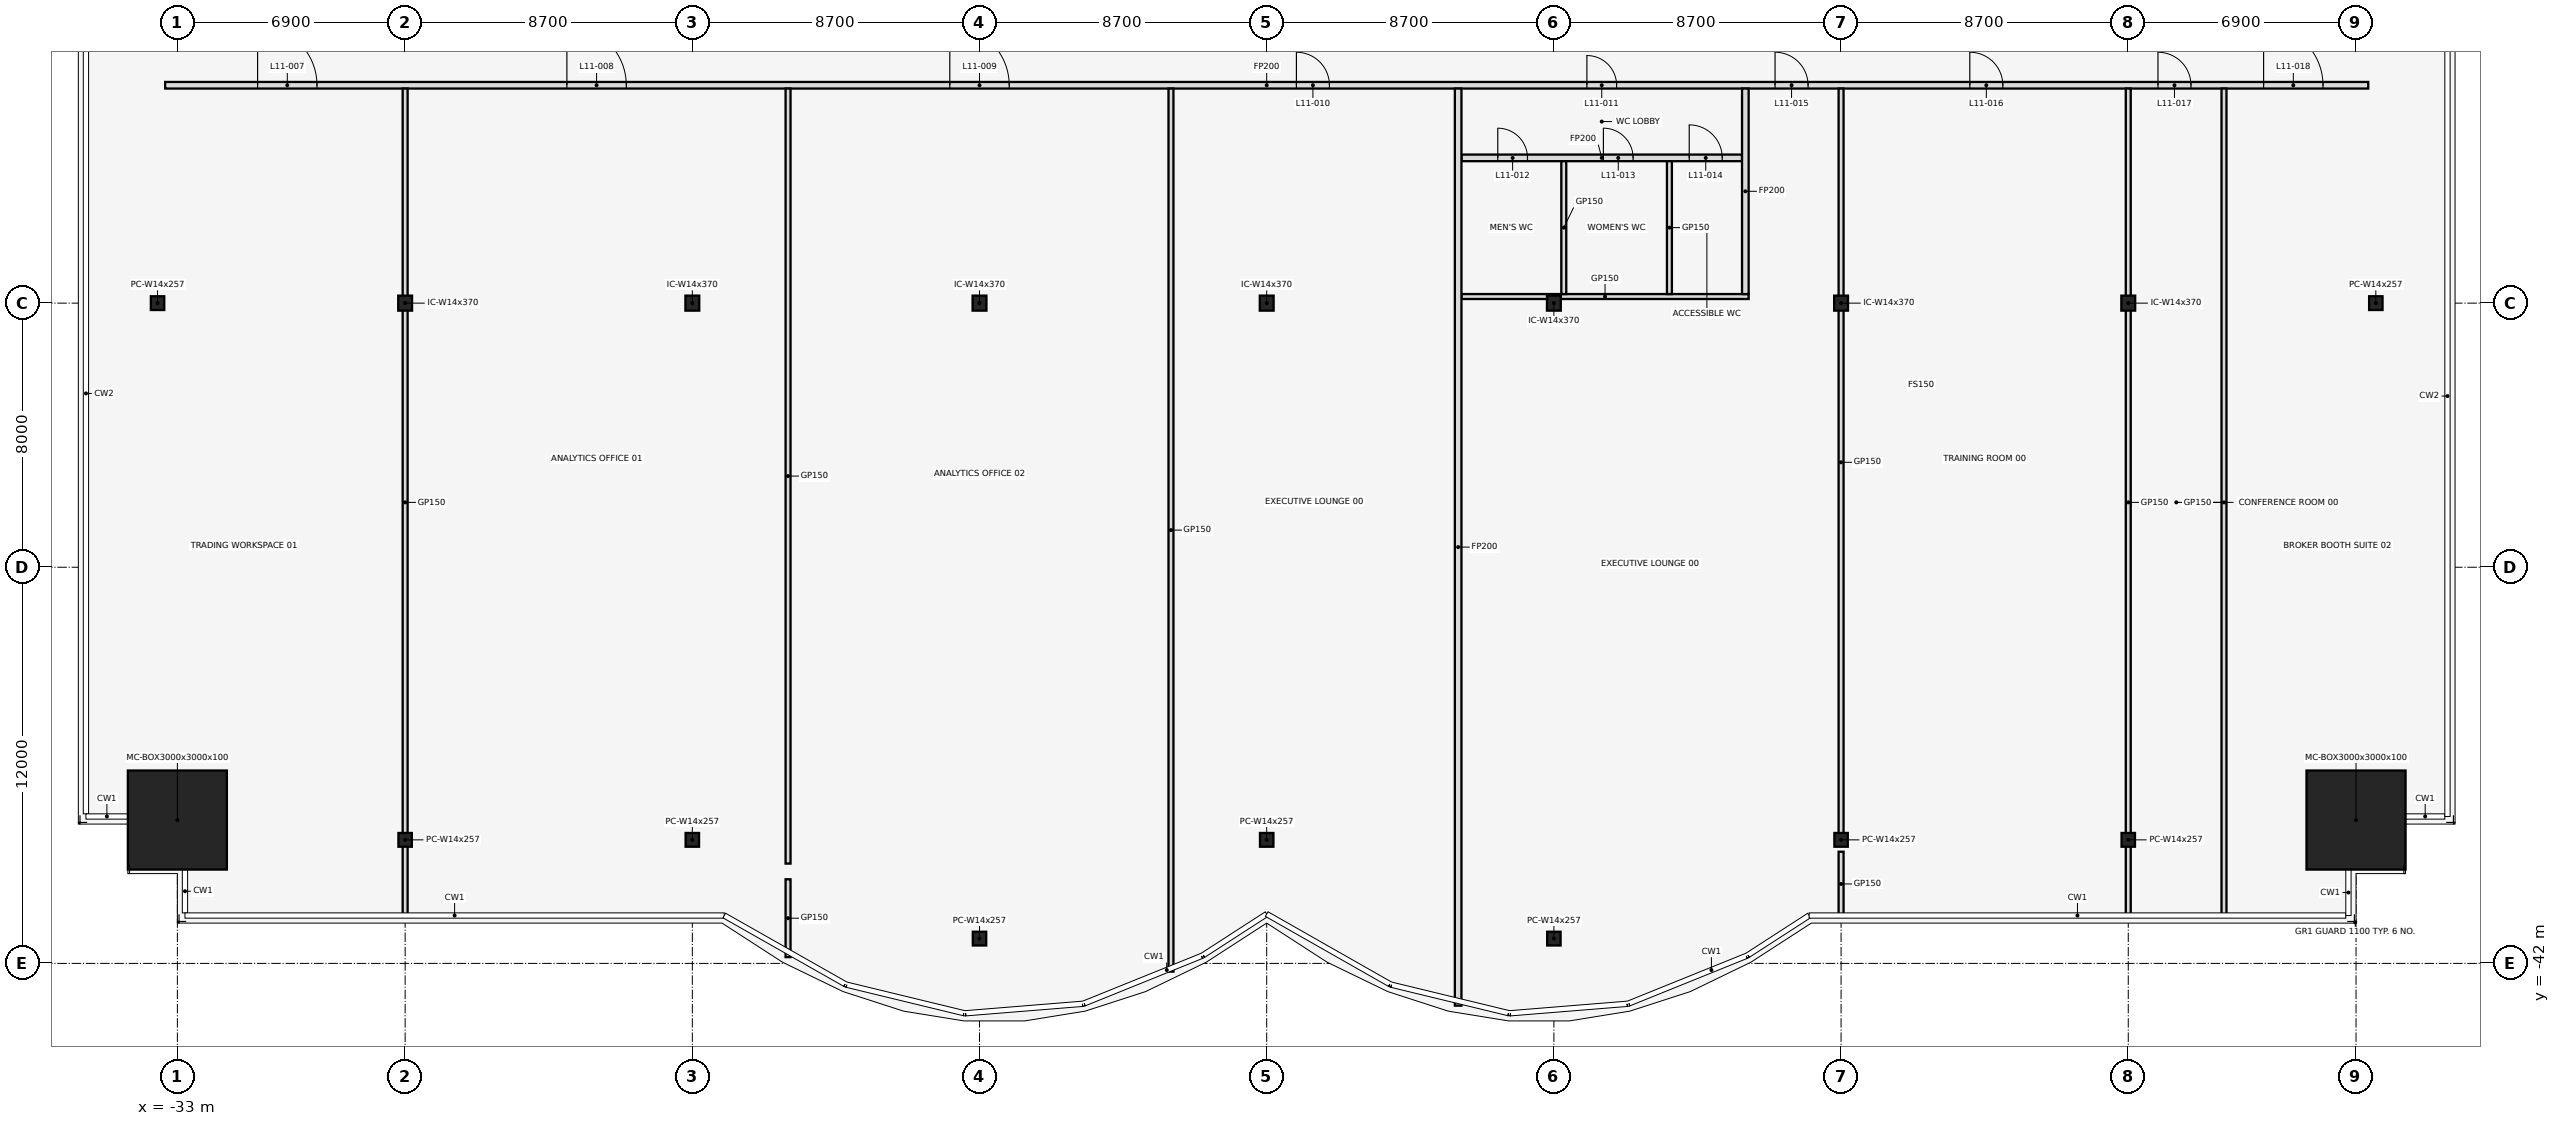
"""IFC4 building model, lengths in metres.
Left out: names, types, materials, properties, quantities, classifications, styles, units other than length and angle.
Written with IfcOpenShell. Run it as: python <this file> out.ifc"""

import sys

from ifc_helpers import new_model, si_unit, direction, frame, frame_2d, origin, origin_2d, place, context, subcontext, project, spatial, rectangle, hollow_rectangle, i_section, extrude, element, fill, save


model = new_model("IFC4")
c1 = context("Model", 3, precision=1e-05, world=origin(), true_north=direction((0.0, 1.0)))
c2 = subcontext(c1, "Body", "Model", "MODEL_VIEW")
j1 = project(units=[si_unit("LENGTHUNIT", "METRE"), si_unit("PLANEANGLEUNIT", "RADIAN")], contexts=[c1])
p1 = place(None, origin())
s1 = spatial("IfcSite", under=j1, at=p1, CompositionType="ELEMENT")
p2 = place(p1, origin())
s2 = spatial("IfcBuilding", under=s1, at=p2, CompositionType="ELEMENT")
p3 = place(p2, frame((0.0, 0.0, 57.5)))
s3 = spatial("IfcBuildingStorey", under=s2, at=p3, CompositionType="ELEMENT", Elevation=57.5)
p4 = place(p3, frame((-33.0, -37.658, 0.0), z_axis=(0.0, 0.0, 1.0), x_axis=(1.0, 0.0, 0.0)))
e1 = element("IfcColumn", 1, at=p4, inside=s3, PredefinedType="COLUMN", context=c2, shape_type="SweptSolid", body=[
    extrude(hollow_rectangle(XDim=3.0, YDim=3.0, WallThickness=0.1, at=origin_2d()), origin(), (0.0, 0.0, 1.0), 4.5),
])
for number, where, z_axis, x_axis in (
    (2, (-26.1, -38.258, 0.0), (0.0, 0.0, 1.0), (1.0, 0.0, 0.0)),
    (3, (-17.4, -38.258, 0.0), (0.0, 0.0, 1.0), (1.0, 0.0, 0.0)),
    (4, (-8.7, -41.249, 0.0), (0.0, 0.0, 1.0), (1.0, 0.0, 0.0)),
    (5, (0.0, -38.258, 0.0), (0.0, 0.0, 1.0), (1.0, 0.0, 0.0)),
    (6, (8.7, -41.249, 0.0), (0.0, 0.0, 1.0), (1.0, 0.0, 0.0)),
    (7, (17.4, -38.258, 0.0), (0.0, 0.0, 1.0), (1.0, 0.0, 0.0)),
    (8, (26.1, -38.258, 0.0), (0.0, 0.0, 1.0), (1.0, 0.0, 0.0)),
):
    element("IfcColumn", number, at=place(p3, frame(where, z_axis=z_axis, x_axis=x_axis)), inside=s3, PredefinedType="COLUMN", context=c2, shape_type="SweptSolid", body=[
        extrude(i_section(OverallWidth=0.406, OverallDepth=0.417, WebThickness=0.03, FlangeThickness=0.048, at=origin_2d()), origin(), (0.0, 0.0, 1.0), 4.5),
    ])
p5 = place(p3, frame((33.0, -37.658, 0.0), z_axis=(0.0, 0.0, 1.0), x_axis=(1.0, 0.0, 0.0)))
e9 = element("IfcColumn", 9, at=p5, inside=s3, PredefinedType="COLUMN", context=c2, shape_type="SweptSolid", body=[
    extrude(hollow_rectangle(XDim=3.0, YDim=3.0, WallThickness=0.1, at=origin_2d()), origin(), (0.0, 0.0, 1.0), 4.5),
])
for number, where, z_axis, x_axis in (
    (10, (-33.6, -22.0, 0.0), (0.0, 0.0, 1.0), (1.0, 0.0, 0.0)),
    (11, (33.6, -22.0, 0.0), (0.0, 0.0, 1.0), (1.0, 0.0, 0.0)),
):
    element("IfcColumn", number, at=place(p3, frame(where, z_axis=z_axis, x_axis=x_axis)), inside=s3, PredefinedType="COLUMN", context=c2, shape_type="SweptSolid", body=[
        extrude(i_section(OverallWidth=0.406, OverallDepth=0.417, WebThickness=0.03, FlangeThickness=0.048, at=origin_2d()), origin(), (0.0, 0.0, 1.0), 4.5),
    ])
for number, where, z_axis, x_axis in (
    (12, (-26.1, -22.0, 0.0), (0.0, 0.0, 1.0), (1.0, 0.0, 0.0)),
    (13, (-17.4, -22.0, 0.0), (0.0, 0.0, 1.0), (1.0, 0.0, 0.0)),
    (14, (-8.7, -22.0, 0.0), (0.0, 0.0, 1.0), (1.0, 0.0, 0.0)),
    (15, (0.0, -22.0, 0.0), (0.0, 0.0, 1.0), (1.0, 0.0, 0.0)),
    (16, (8.7, -22.0, 0.0), (0.0, 0.0, 1.0), (1.0, 0.0, 0.0)),
    (17, (17.4, -22.0, 0.0), (0.0, 0.0, 1.0), (1.0, 0.0, 0.0)),
    (18, (26.1, -22.0, 0.0), (0.0, 0.0, 1.0), (1.0, 0.0, 0.0)),
):
    element("IfcColumn", number, at=place(p3, frame(where, z_axis=z_axis, x_axis=x_axis)), inside=s3, PredefinedType="COLUMN", context=c2, shape_type="SweptSolid", body=[
        extrude(i_section(OverallWidth=0.419, OverallDepth=0.455, WebThickness=0.042, FlangeThickness=0.068, at=origin_2d()), origin(), (0.0, 0.0, 1.0), 4.5),
    ])
p6 = place(p3, frame((5.9, -21.8, 0.0), z_axis=(0.0, 0.0, 1.0), x_axis=(1.0, 0.0, 0.0)))
e19 = element("IfcWall", 19, at=p6, inside=s3, PredefinedType="PARTITIONING", context=c2, shape_type="SweptSolid", body=[
    extrude(rectangle(XDim=8.7, YDim=0.15, at=frame_2d((4.35, 0.0))), origin(), (0.0, 0.0, 1.0), 3.418),
])
p7 = place(p3, frame((5.9, -17.6, 0.0), z_axis=(0.0, 0.0, 1.0), x_axis=(1.0, 0.0, 0.0)))
e20 = element("IfcWall", 20, at=p7, inside=s3, PredefinedType="PARTITIONING", context=c2, shape_type="SweptSolid", body=[
    extrude(rectangle(XDim=8.5, YDim=0.2, at=frame_2d((4.25, 0.0))), origin(), (0.0, 0.0, 1.0), 3.418),
])
p8 = place(p7, frame((1.1, 0.0, 0.0)))
e21 = element("IfcOpeningElement", 21, at=p8, cuts=e20, PredefinedType="OPENING", context=c2, shape_type="SweptSolid", body=[
    extrude(rectangle(XDim=0.9, YDim=2.1, at=frame_2d((0.45, 1.05))), frame((0.0, 0.112, 0.0), z_axis=(0.0, -1.0, 0.0), x_axis=(1.0, 0.0, 0.0)), (0.0, 0.0, 1.0), 0.224),
])
p9 = place(p7, frame((4.3, 0.0, 0.0)))
e22 = element("IfcOpeningElement", 22, at=p9, cuts=e20, PredefinedType="OPENING", context=c2, shape_type="SweptSolid", body=[
    extrude(rectangle(XDim=0.9, YDim=2.1, at=frame_2d((0.45, 1.05))), frame((0.0, 0.112, 0.0), z_axis=(0.0, -1.0, 0.0), x_axis=(1.0, 0.0, 0.0)), (0.0, 0.0, 1.0), 0.224),
])
p10 = place(p7, frame((6.9, 0.0, 0.0)))
e23 = element("IfcOpeningElement", 23, at=p10, cuts=e20, PredefinedType="OPENING", context=c2, shape_type="SweptSolid", body=[
    extrude(rectangle(XDim=1.0, YDim=2.1, at=frame_2d((0.5, 1.05))), frame((0.0, 0.112, 0.0), z_axis=(0.0, -1.0, 0.0), x_axis=(1.0, 0.0, 0.0)), (0.0, 0.0, 1.0), 0.224),
])
p11 = place(p3, frame((-33.37, -15.4, 0.0), z_axis=(0.0, 0.0, 1.0), x_axis=(1.0, 0.0, 0.0)))
e24 = element("IfcWall", 24, at=p11, inside=s3, PredefinedType="PARTITIONING", context=c2, shape_type="SweptSolid", body=[
    extrude(rectangle(XDim=66.74, YDim=0.2, at=frame_2d((33.37, 0.0))), origin(), (0.0, 0.0, 1.0), 3.418),
])
p12 = place(p11, frame((2.8, 0.0, 0.0)))
e25 = element("IfcOpeningElement", 25, at=p12, cuts=e24, PredefinedType="OPENING", context=c2, shape_type="SweptSolid", body=[
    extrude(rectangle(XDim=1.8, YDim=2.1, at=frame_2d((0.9, 1.05))), frame((0.0, 0.112, 0.0), z_axis=(0.0, -1.0, 0.0), x_axis=(1.0, 0.0, 0.0)), (0.0, 0.0, 1.0), 0.224),
])
p13 = place(p11, frame((12.17, 0.0, 0.0)))
e26 = element("IfcOpeningElement", 26, at=p13, cuts=e24, PredefinedType="OPENING", context=c2, shape_type="SweptSolid", body=[
    extrude(rectangle(XDim=1.8, YDim=2.1, at=frame_2d((0.9, 1.05))), frame((0.0, 0.112, 0.0), z_axis=(0.0, -1.0, 0.0), x_axis=(1.0, 0.0, 0.0)), (0.0, 0.0, 1.0), 0.224),
])
p14 = place(p11, frame((23.77, 0.0, 0.0)))
e27 = element("IfcOpeningElement", 27, at=p14, cuts=e24, PredefinedType="OPENING", context=c2, shape_type="SweptSolid", body=[
    extrude(rectangle(XDim=1.8, YDim=2.1, at=frame_2d((0.9, 1.05))), frame((0.0, 0.112, 0.0), z_axis=(0.0, -1.0, 0.0), x_axis=(1.0, 0.0, 0.0)), (0.0, 0.0, 1.0), 0.224),
])
p15 = place(p11, frame((34.27, 0.0, 0.0)))
e28 = element("IfcOpeningElement", 28, at=p15, cuts=e24, PredefinedType="OPENING", context=c2, shape_type="SweptSolid", body=[
    extrude(rectangle(XDim=1.0, YDim=2.1, at=frame_2d((0.5, 1.05))), frame((0.0, 0.112, 0.0), z_axis=(0.0, -1.0, 0.0), x_axis=(1.0, 0.0, 0.0)), (0.0, 0.0, 1.0), 0.224),
])
p16 = place(p11, frame((43.07, 0.0, 0.0)))
e29 = element("IfcOpeningElement", 29, at=p16, cuts=e24, PredefinedType="OPENING", context=c2, shape_type="SweptSolid", body=[
    extrude(rectangle(XDim=0.9, YDim=2.1, at=frame_2d((0.45, 1.05))), frame((0.0, 0.112, 0.0), z_axis=(0.0, -1.0, 0.0), x_axis=(1.0, 0.0, 0.0)), (0.0, 0.0, 1.0), 0.224),
])
p17 = place(p11, frame((48.77, 0.0, 0.0)))
e30 = element("IfcOpeningElement", 30, at=p17, cuts=e24, PredefinedType="OPENING", context=c2, shape_type="SweptSolid", body=[
    extrude(rectangle(XDim=1.0, YDim=2.1, at=frame_2d((0.5, 1.05))), frame((0.0, 0.112, 0.0), z_axis=(0.0, -1.0, 0.0), x_axis=(1.0, 0.0, 0.0)), (0.0, 0.0, 1.0), 0.224),
])
p18 = place(p11, frame((54.67, 0.0, 0.0)))
e31 = element("IfcOpeningElement", 31, at=p18, cuts=e24, PredefinedType="OPENING", context=c2, shape_type="SweptSolid", body=[
    extrude(rectangle(XDim=1.0, YDim=2.1, at=frame_2d((0.5, 1.05))), frame((0.0, 0.112, 0.0), z_axis=(0.0, -1.0, 0.0), x_axis=(1.0, 0.0, 0.0)), (0.0, 0.0, 1.0), 0.224),
])
p19 = place(p11, frame((60.37, 0.0, 0.0)))
e32 = element("IfcOpeningElement", 32, at=p19, cuts=e24, PredefinedType="OPENING", context=c2, shape_type="SweptSolid", body=[
    extrude(rectangle(XDim=1.0, YDim=2.1, at=frame_2d((0.5, 1.05))), frame((0.0, 0.112, 0.0), z_axis=(0.0, -1.0, 0.0), x_axis=(1.0, 0.0, 0.0)), (0.0, 0.0, 1.0), 0.224),
])
p20 = place(p11, frame((63.57, 0.0, 0.0)))
e33 = element("IfcOpeningElement", 33, at=p20, cuts=e24, PredefinedType="OPENING", context=c2, shape_type="SweptSolid", body=[
    extrude(rectangle(XDim=1.8, YDim=2.1, at=frame_2d((0.9, 1.05))), frame((0.0, 0.112, 0.0), z_axis=(0.0, -1.0, 0.0), x_axis=(1.0, 0.0, 0.0)), (0.0, 0.0, 1.0), 0.224),
])
p21 = place(p3, frame((-26.1, -40.57, 0.0), z_axis=(0.0, 0.0, 1.0), x_axis=(0.0, 1.0, 0.0)))
e34 = element("IfcWall", 34, at=p21, inside=s3, PredefinedType="PARTITIONING", context=c2, shape_type="SweptSolid", body=[
    extrude(rectangle(XDim=25.07, YDim=0.15, at=frame_2d((12.535, 0.0))), origin(), (0.0, 0.0, 1.0), 3.418),
])
p22 = place(p3, frame((-14.5, -41.81, 0.0), z_axis=(0.0, 0.0, 1.0), x_axis=(0.0, 1.0, 0.0)))
e35 = element("IfcWall", 35, at=p22, inside=s3, PredefinedType="PARTITIONING", context=c2, shape_type="SweptSolid", body=[
    extrude(rectangle(XDim=2.358, YDim=0.15, at=frame_2d((1.179, 0.0))), origin(), (0.0, 0.0, 1.0), 3.418),
])
p23 = place(p3, frame((-14.5, -38.977, 0.0), z_axis=(0.0, 0.0, 1.0), x_axis=(0.0, 1.0, 0.0)))
e36 = element("IfcWall", 36, at=p23, inside=s3, PredefinedType="PARTITIONING", context=c2, shape_type="SweptSolid", body=[
    extrude(rectangle(XDim=23.477, YDim=0.15, at=frame_2d((11.739, 0.0))), origin(), (0.0, 0.0, 1.0), 3.418),
])
p24 = place(p3, frame((-2.9, -42.25, 0.0), z_axis=(0.0, 0.0, 1.0), x_axis=(0.0, 1.0, 0.0)))
e37 = element("IfcWall", 37, at=p24, inside=s3, PredefinedType="PARTITIONING", context=c2, shape_type="SweptSolid", body=[
    extrude(rectangle(XDim=26.75, YDim=0.15, at=frame_2d((13.375, 0.0))), origin(), (0.0, 0.0, 1.0), 3.418),
])
p25 = place(p3, frame((5.8, -43.28, 0.0), z_axis=(0.0, 0.0, 1.0), x_axis=(0.0, 1.0, 0.0)))
e38 = element("IfcWall", 38, at=p25, inside=s3, PredefinedType="PARTITIONING", context=c2, shape_type="SweptSolid", body=[
    extrude(rectangle(XDim=27.78, YDim=0.2, at=frame_2d((13.89, 0.0))), origin(), (0.0, 0.0, 1.0), 3.418),
])
for number, where, z_axis, x_axis in (
    (39, (9.0, -21.725, 0.0), (0.0, 0.0, 1.0), (0.0, 1.0, 0.0)),
    (40, (12.2, -21.725, 0.0), (0.0, 0.0, 1.0), (0.0, 1.0, 0.0)),
):
    element("IfcWall", number, at=place(p3, frame(where, z_axis=z_axis, x_axis=x_axis)), inside=s3, PredefinedType="PARTITIONING", context=c2, shape_type="SweptSolid", body=[
        extrude(rectangle(XDim=4.025, YDim=0.15, at=frame_2d((2.013, 0.0))), origin(), (0.0, 0.0, 1.0), 3.418),
    ])
p26 = place(p3, frame((14.5, -21.725, 0.0), z_axis=(0.0, 0.0, 1.0), x_axis=(0.0, 1.0, 0.0)))
e41 = element("IfcWall", 41, at=p26, inside=s3, PredefinedType="PARTITIONING", context=c2, shape_type="SweptSolid", body=[
    extrude(rectangle(XDim=6.225, YDim=0.2, at=frame_2d((3.113, 0.0))), origin(), (0.0, 0.0, 1.0), 3.418),
])
p27 = place(p3, frame((17.4, -40.57, 0.0), z_axis=(0.0, 0.0, 1.0), x_axis=(0.0, 1.0, 0.0)))
e42 = element("IfcWall", 42, at=p27, inside=s3, PredefinedType="PARTITIONING", context=c2, shape_type="SweptSolid", body=[
    extrude(rectangle(XDim=1.953, YDim=0.15, at=frame_2d((0.977, 0.0))), origin(), (0.0, 0.0, 1.0), 3.418),
])
p28 = place(p3, frame((17.4, -38.143, 0.0), z_axis=(0.0, 0.0, 1.0), x_axis=(0.0, 1.0, 0.0)))
e43 = element("IfcWall", 43, at=p28, inside=s3, PredefinedType="PARTITIONING", context=c2, shape_type="SweptSolid", body=[
    extrude(rectangle(XDim=22.643, YDim=0.15, at=frame_2d((11.321, 0.0))), origin(), (0.0, 0.0, 1.0), 3.418),
])
for number, where, z_axis, x_axis in (
    (44, (26.1, -40.57, 0.0), (0.0, 0.0, 1.0), (0.0, 1.0, 0.0)),
    (45, (29.0, -40.57, 0.0), (0.0, 0.0, 1.0), (0.0, 1.0, 0.0)),
):
    element("IfcWall", number, at=place(p3, frame(where, z_axis=z_axis, x_axis=x_axis)), inside=s3, PredefinedType="PARTITIONING", context=c2, shape_type="SweptSolid", body=[
        extrude(rectangle(XDim=25.07, YDim=0.15, at=frame_2d((12.535, 0.0))), origin(), (0.0, 0.0, 1.0), 3.418),
    ])
p29 = place(p12, origin())
e46 = element("IfcDoor", 46, at=p29, inside=s3, OperationType="SINGLE_SWING_LEFT", PredefinedType="DOOR", context=c2, shape_type="SweptSolid", body=[
    extrude(rectangle(XDim=1.8, YDim=2.1, at=frame_2d((0.9, 1.05))), frame((0.0, 0.025, 0.0), z_axis=(0.0, -1.0, 0.0), x_axis=(1.0, 0.0, 0.0)), (0.0, 0.0, 1.0), 0.05),
])
fill(e25, e46)
p30 = place(p13, origin())
e47 = element("IfcDoor", 47, at=p30, inside=s3, OperationType="SINGLE_SWING_LEFT", PredefinedType="DOOR", context=c2, shape_type="SweptSolid", body=[
    extrude(rectangle(XDim=1.8, YDim=2.1, at=frame_2d((0.9, 1.05))), frame((0.0, 0.025, 0.0), z_axis=(0.0, -1.0, 0.0), x_axis=(1.0, 0.0, 0.0)), (0.0, 0.0, 1.0), 0.05),
])
fill(e26, e47)
p31 = place(p14, origin())
e48 = element("IfcDoor", 48, at=p31, inside=s3, OperationType="SINGLE_SWING_LEFT", PredefinedType="DOOR", context=c2, shape_type="SweptSolid", body=[
    extrude(rectangle(XDim=1.8, YDim=2.1, at=frame_2d((0.9, 1.05))), frame((0.0, 0.025, 0.0), z_axis=(0.0, -1.0, 0.0), x_axis=(1.0, 0.0, 0.0)), (0.0, 0.0, 1.0), 0.05),
])
fill(e27, e48)
p32 = place(p15, frame((1.0, 0.0, 0.0), z_axis=(0.0, 0.0, 1.0), x_axis=(-1.0, 0.0, 0.0)))
e49 = element("IfcDoor", 49, at=p32, inside=s3, OperationType="SINGLE_SWING_LEFT", PredefinedType="DOOR", context=c2, shape_type="SweptSolid", body=[
    extrude(rectangle(XDim=1.0, YDim=2.1, at=frame_2d((0.5, 1.05))), frame((0.0, 0.025, 0.0), z_axis=(0.0, -1.0, 0.0), x_axis=(1.0, 0.0, 0.0)), (0.0, 0.0, 1.0), 0.05),
])
fill(e28, e49)
p33 = place(p16, frame((0.9, 0.0, 0.0), z_axis=(0.0, 0.0, 1.0), x_axis=(-1.0, 0.0, 0.0)))
e50 = element("IfcDoor", 50, at=p33, inside=s3, OperationType="SINGLE_SWING_RIGHT", PredefinedType="DOOR", context=c2, shape_type="SweptSolid", body=[
    extrude(rectangle(XDim=0.9, YDim=2.1, at=frame_2d((0.45, 1.05))), frame((0.0, 0.025, 0.0), z_axis=(0.0, -1.0, 0.0), x_axis=(1.0, 0.0, 0.0)), (0.0, 0.0, 1.0), 0.05),
])
fill(e29, e50)
p34 = place(p8, frame((0.9, 0.0, 0.0), z_axis=(0.0, 0.0, 1.0), x_axis=(-1.0, 0.0, 0.0)))
e51 = element("IfcDoor", 51, at=p34, inside=s3, OperationType="SINGLE_SWING_RIGHT", PredefinedType="DOOR", context=c2, shape_type="SweptSolid", body=[
    extrude(rectangle(XDim=0.9, YDim=2.1, at=frame_2d((0.45, 1.05))), frame((0.0, 0.025, 0.0), z_axis=(0.0, -1.0, 0.0), x_axis=(1.0, 0.0, 0.0)), (0.0, 0.0, 1.0), 0.05),
])
fill(e21, e51)
p35 = place(p9, frame((0.9, 0.0, 0.0), z_axis=(0.0, 0.0, 1.0), x_axis=(-1.0, 0.0, 0.0)))
e52 = element("IfcDoor", 52, at=p35, inside=s3, OperationType="SINGLE_SWING_LEFT", PredefinedType="DOOR", context=c2, shape_type="SweptSolid", body=[
    extrude(rectangle(XDim=0.9, YDim=2.1, at=frame_2d((0.45, 1.05))), frame((0.0, 0.025, 0.0), z_axis=(0.0, -1.0, 0.0), x_axis=(1.0, 0.0, 0.0)), (0.0, 0.0, 1.0), 0.05),
])
fill(e22, e52)
p36 = place(p10, frame((1.0, 0.0, 0.0), z_axis=(0.0, 0.0, 1.0), x_axis=(-1.0, 0.0, 0.0)))
e53 = element("IfcDoor", 53, at=p36, inside=s3, OperationType="SINGLE_SWING_RIGHT", PredefinedType="DOOR", context=c2, shape_type="SweptSolid", body=[
    extrude(rectangle(XDim=1.0, YDim=2.1, at=frame_2d((0.5, 1.05))), frame((0.0, 0.025, 0.0), z_axis=(0.0, -1.0, 0.0), x_axis=(1.0, 0.0, 0.0)), (0.0, 0.0, 1.0), 0.05),
])
fill(e23, e53)
p37 = place(p17, frame((1.0, 0.0, 0.0), z_axis=(0.0, 0.0, 1.0), x_axis=(-1.0, 0.0, 0.0)))
e54 = element("IfcDoor", 54, at=p37, inside=s3, OperationType="SINGLE_SWING_RIGHT", PredefinedType="DOOR", context=c2, shape_type="SweptSolid", body=[
    extrude(rectangle(XDim=1.0, YDim=2.1, at=frame_2d((0.5, 1.05))), frame((0.0, 0.025, 0.0), z_axis=(0.0, -1.0, 0.0), x_axis=(1.0, 0.0, 0.0)), (0.0, 0.0, 1.0), 0.05),
])
fill(e30, e54)
p38 = place(p18, frame((1.0, 0.0, 0.0), z_axis=(0.0, 0.0, 1.0), x_axis=(-1.0, 0.0, 0.0)))
e55 = element("IfcDoor", 55, at=p38, inside=s3, OperationType="SINGLE_SWING_LEFT", PredefinedType="DOOR", context=c2, shape_type="SweptSolid", body=[
    extrude(rectangle(XDim=1.0, YDim=2.1, at=frame_2d((0.5, 1.05))), frame((0.0, 0.025, 0.0), z_axis=(0.0, -1.0, 0.0), x_axis=(1.0, 0.0, 0.0)), (0.0, 0.0, 1.0), 0.05),
])
fill(e31, e55)
p39 = place(p19, frame((1.0, 0.0, 0.0), z_axis=(0.0, 0.0, 1.0), x_axis=(-1.0, 0.0, 0.0)))
e56 = element("IfcDoor", 56, at=p39, inside=s3, OperationType="SINGLE_SWING_RIGHT", PredefinedType="DOOR", context=c2, shape_type="SweptSolid", body=[
    extrude(rectangle(XDim=1.0, YDim=2.1, at=frame_2d((0.5, 1.05))), frame((0.0, 0.025, 0.0), z_axis=(0.0, -1.0, 0.0), x_axis=(1.0, 0.0, 0.0)), (0.0, 0.0, 1.0), 0.05),
])
fill(e32, e56)
p40 = place(p20, origin())
e57 = element("IfcDoor", 57, at=p40, inside=s3, OperationType="SINGLE_SWING_LEFT", PredefinedType="DOOR", context=c2, shape_type="SweptSolid", body=[
    extrude(rectangle(XDim=1.8, YDim=2.1, at=frame_2d((0.9, 1.05))), frame((0.0, 0.025, 0.0), z_axis=(0.0, -1.0, 0.0), x_axis=(1.0, 0.0, 0.0)), (0.0, 0.0, 1.0), 0.05),
])
fill(e33, e57)
save(model, sys.argv[1])
